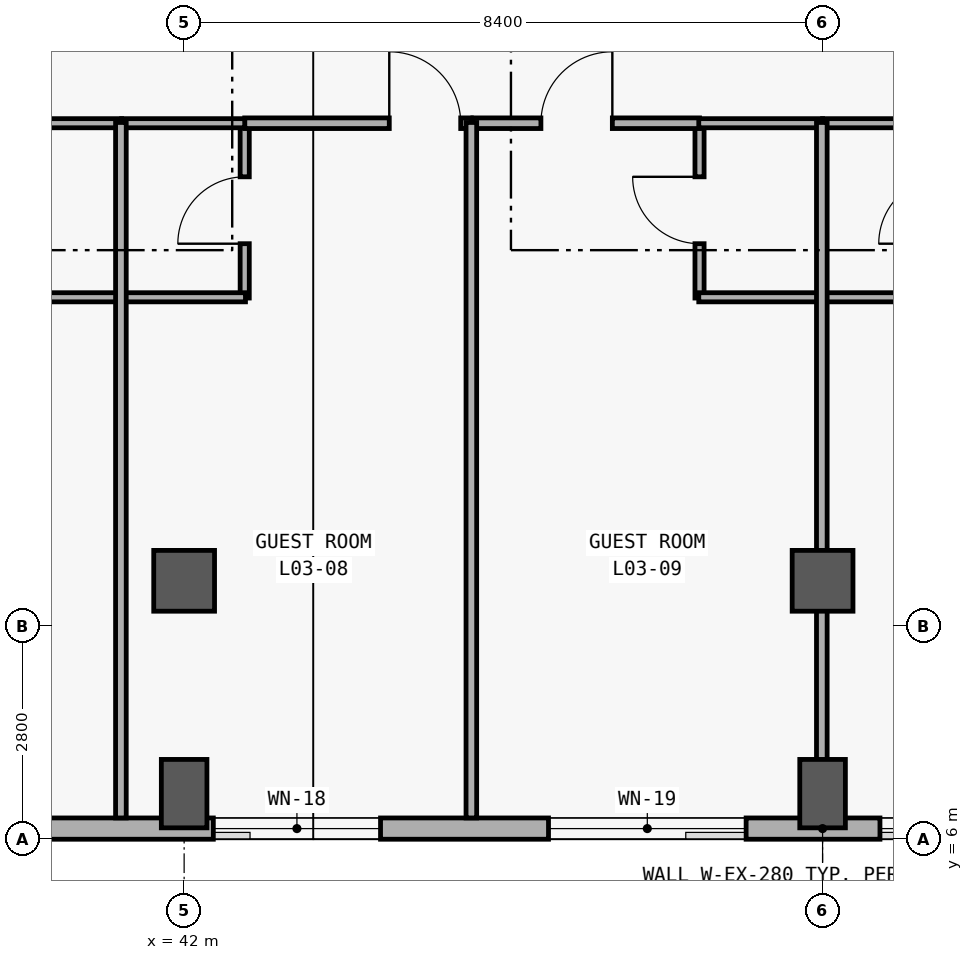
"""IFC4 building model, lengths in metres.
Left out: names, types, materials, properties, quantities, classifications, styles, units other than length and angle.
Written with IfcOpenShell. Run it as: python <this file> out.ifc"""

import sys

from ifc_helpers import new_model, si_unit, direction, frame, frame_2d, origin, origin_2d, place, context, subcontext, project, spatial, rectangle, extrude, element, fill, save


model = new_model("IFC4")
c1 = context("Model", 3, precision=1e-05, world=origin(), true_north=direction((0.0, 1.0)))
c2 = subcontext(c1, "Body", "Model", "MODEL_VIEW")
j1 = project(units=[si_unit("LENGTHUNIT", "METRE"), si_unit("PLANEANGLEUNIT", "RADIAN")], contexts=[c1])
p1 = place(None, origin())
s1 = spatial("IfcSite", under=j1, at=p1, CompositionType="ELEMENT")
p2 = place(p1, origin())
s2 = spatial("IfcBuilding", under=s1, at=p2, CompositionType="ELEMENT")
p3 = place(p2, frame((0.0, 0.0, 15.0)))
s3 = spatial("IfcBuildingStorey", under=s2, at=p3, CompositionType="ELEMENT", Elevation=15.0)
p4 = place(p3, frame((42.0, 6.6, 0.0), z_axis=(0.0, 0.0, 1.0), x_axis=(0.0, 1.0, 0.0)))
e1 = element("IfcColumn", 1, at=p4, inside=s3, PredefinedType="COLUMN", context=c2, shape_type="SweptSolid", body=[
    extrude(rectangle(XDim=0.6, YDim=0.9, at=origin_2d()), origin(), (0.0, 0.0, 1.0), 4.2),
])
p5 = place(p3, frame((42.0, 9.4, 0.0), z_axis=(0.0, 0.0, 1.0), x_axis=(1.0, 0.0, 0.0)))
e2 = element("IfcColumn", 2, at=p5, inside=s3, PredefinedType="COLUMN", context=c2, shape_type="SweptSolid", body=[
    extrude(rectangle(XDim=0.8, YDim=0.8, at=origin_2d()), origin(), (0.0, 0.0, 1.0), 4.2),
])
p6 = place(p3, frame((50.4, 6.6, 0.0), z_axis=(0.0, 0.0, 1.0), x_axis=(0.0, 1.0, 0.0)))
e3 = element("IfcColumn", 3, at=p6, inside=s3, PredefinedType="COLUMN", context=c2, shape_type="SweptSolid", body=[
    extrude(rectangle(XDim=0.6, YDim=0.9, at=origin_2d()), origin(), (0.0, 0.0, 1.0), 4.2),
])
p7 = place(p3, frame((50.4, 9.4, 0.0), z_axis=(0.0, 0.0, 1.0), x_axis=(1.0, 0.0, 0.0)))
e4 = element("IfcColumn", 4, at=p7, inside=s3, PredefinedType="COLUMN", context=c2, shape_type="SweptSolid", body=[
    extrude(rectangle(XDim=0.8, YDim=0.8, at=origin_2d()), origin(), (0.0, 0.0, 1.0), 4.2),
])
p8 = place(p3, frame((92.12, 6.14, 0.0), z_axis=(0.0, 0.0, 1.0), x_axis=(-1.0, 0.0, 0.0)))
e5 = element("IfcWall", 5, at=p8, inside=s3, PredefinedType="SOLIDWALL", context=c2, shape_type="SweptSolid", body=[
    extrude(rectangle(XDim=83.44, YDim=0.28, at=frame_2d((41.72, 0.0))), origin(), (0.0, 0.0, 1.0), 3.92),
])
p9 = place(p8, frame((79.49, 0.0, 0.85)))
e6 = element("IfcOpeningElement", 6, at=p9, cuts=e5, PredefinedType="OPENING", context=c2, shape_type="SweptSolid", body=[
    extrude(rectangle(XDim=2.85, YDim=1.85, at=frame_2d((1.425, 0.925))), frame((0.0, 0.15, 0.0), z_axis=(0.0, -1.0, 0.0), x_axis=(1.0, 0.0, 0.0)), (0.0, 0.0, 1.0), 0.3),
])
p10 = place(p8, frame((74.704, 0.0, 0.85)))
e7 = element("IfcOpeningElement", 7, at=p10, cuts=e5, PredefinedType="OPENING", context=c2, shape_type="SweptSolid", body=[
    extrude(rectangle(XDim=3.2, YDim=1.95, at=frame_2d((1.6, 0.975))), frame((0.0, 0.15, 0.0), z_axis=(0.0, -1.0, 0.0), x_axis=(1.0, 0.0, 0.0)), (0.0, 0.0, 1.0), 0.3),
])
p11 = place(p8, frame((69.942, 0.0, 0.85)))
e8 = element("IfcOpeningElement", 8, at=p11, cuts=e5, PredefinedType="OPENING", context=c2, shape_type="SweptSolid", body=[
    extrude(rectangle(XDim=3.5, YDim=2.0, at=frame_2d((1.75, 1.0))), frame((0.0, 0.15, 0.0), z_axis=(0.0, -1.0, 0.0), x_axis=(1.0, 0.0, 0.0)), (0.0, 0.0, 1.0), 0.3),
])
p12 = place(p8, frame((66.382, 0.0, 0.85)))
e9 = element("IfcOpeningElement", 9, at=p12, cuts=e5, PredefinedType="OPENING", context=c2, shape_type="SweptSolid", body=[
    extrude(rectangle(XDim=1.4, YDim=1.6, at=frame_2d((0.7, 0.8))), frame((0.0, 0.15, 0.0), z_axis=(0.0, -1.0, 0.0), x_axis=(1.0, 0.0, 0.0)), (0.0, 0.0, 1.0), 0.3),
])
p13 = place(p8, frame((61.67, 0.0, 0.85)))
e10 = element("IfcOpeningElement", 10, at=p13, cuts=e5, PredefinedType="OPENING", context=c2, shape_type="SweptSolid", body=[
    extrude(rectangle(XDim=1.6, YDim=1.6, at=frame_2d((0.8, 0.8))), frame((0.0, 0.15, 0.0), z_axis=(0.0, -1.0, 0.0), x_axis=(1.0, 0.0, 0.0)), (0.0, 0.0, 1.0), 0.3),
])
p14 = place(p8, frame((56.959, 0.0, 0.85)))
e11 = element("IfcOpeningElement", 11, at=p14, cuts=e5, PredefinedType="OPENING", context=c2, shape_type="SweptSolid", body=[
    extrude(rectangle(XDim=1.8, YDim=1.6, at=frame_2d((0.9, 0.8))), frame((0.0, 0.15, 0.0), z_axis=(0.0, -1.0, 0.0), x_axis=(1.0, 0.0, 0.0)), (0.0, 0.0, 1.0), 0.3),
])
p15 = place(p8, frame((52.248, 0.0, 0.85)))
e12 = element("IfcOpeningElement", 12, at=p15, cuts=e5, PredefinedType="OPENING", context=c2, shape_type="SweptSolid", body=[
    extrude(rectangle(XDim=2.0, YDim=1.65, at=frame_2d((1.0, 0.825))), frame((0.0, 0.15, 0.0), z_axis=(0.0, -1.0, 0.0), x_axis=(1.0, 0.0, 0.0)), (0.0, 0.0, 1.0), 0.3),
])
p16 = place(p8, frame((47.536, 0.0, 0.85)))
e13 = element("IfcOpeningElement", 13, at=p16, cuts=e5, PredefinedType="OPENING", context=c2, shape_type="SweptSolid", body=[
    extrude(rectangle(XDim=2.2, YDim=1.65, at=frame_2d((1.1, 0.825))), frame((0.0, 0.15, 0.0), z_axis=(0.0, -1.0, 0.0), x_axis=(1.0, 0.0, 0.0)), (0.0, 0.0, 1.0), 0.3),
])
p17 = place(p8, frame((42.726, 0.0, 0.85)))
e14 = element("IfcOpeningElement", 14, at=p17, cuts=e5, PredefinedType="OPENING", context=c2, shape_type="SweptSolid", body=[
    extrude(rectangle(XDim=2.6, YDim=2.2, at=frame_2d((1.3, 1.1))), frame((0.0, 0.15, 0.0), z_axis=(0.0, -1.0, 0.0), x_axis=(1.0, 0.0, 0.0)), (0.0, 0.0, 1.0), 0.3),
])
p18 = place(p8, frame((37.865, 0.0, 0.85)))
e15 = element("IfcOpeningElement", 15, at=p18, cuts=e5, PredefinedType="OPENING", context=c2, shape_type="SweptSolid", body=[
    extrude(rectangle(XDim=3.1, YDim=2.2, at=frame_2d((1.55, 1.1))), frame((0.0, 0.15, 0.0), z_axis=(0.0, -1.0, 0.0), x_axis=(1.0, 0.0, 0.0)), (0.0, 0.0, 1.0), 0.3),
])
p19 = place(p8, frame((33.004, 0.0, 0.85)))
e16 = element("IfcOpeningElement", 16, at=p19, cuts=e5, PredefinedType="OPENING", context=c2, shape_type="SweptSolid", body=[
    extrude(rectangle(XDim=3.6, YDim=2.3, at=frame_2d((1.8, 1.15))), frame((0.0, 0.15, 0.0), z_axis=(0.0, -1.0, 0.0), x_axis=(1.0, 0.0, 0.0)), (0.0, 0.0, 1.0), 0.3),
])
p20 = place(p8, frame((29.568, 0.0, 0.85)))
e17 = element("IfcOpeningElement", 17, at=p20, cuts=e5, PredefinedType="OPENING", context=c2, shape_type="SweptSolid", body=[
    extrude(rectangle(XDim=1.25, YDim=1.45, at=frame_2d((0.625, 0.725))), frame((0.0, 0.15, 0.0), z_axis=(0.0, -1.0, 0.0), x_axis=(1.0, 0.0, 0.0)), (0.0, 0.0, 1.0), 0.3),
])
p21 = place(p8, frame((24.907, 0.0, 0.85)))
e18 = element("IfcOpeningElement", 18, at=p21, cuts=e5, PredefinedType="OPENING", context=c2, shape_type="SweptSolid", body=[
    extrude(rectangle(XDim=1.35, YDim=1.55, at=frame_2d((0.675, 0.775))), frame((0.0, 0.15, 0.0), z_axis=(0.0, -1.0, 0.0), x_axis=(1.0, 0.0, 0.0)), (0.0, 0.0, 1.0), 0.3),
])
p22 = place(p8, frame((20.245, 0.0, 0.85)))
e19 = element("IfcOpeningElement", 19, at=p22, cuts=e5, PredefinedType="OPENING", context=c2, shape_type="SweptSolid", body=[
    extrude(rectangle(XDim=1.45, YDim=1.65, at=frame_2d((0.725, 0.825))), frame((0.0, 0.15, 0.0), z_axis=(0.0, -1.0, 0.0), x_axis=(1.0, 0.0, 0.0)), (0.0, 0.0, 1.0), 0.3),
])
p23 = place(p8, frame((15.584, 0.0, 0.85)))
e20 = element("IfcOpeningElement", 20, at=p23, cuts=e5, PredefinedType="OPENING", context=c2, shape_type="SweptSolid", body=[
    extrude(rectangle(XDim=1.55, YDim=1.65, at=frame_2d((0.775, 0.825))), frame((0.0, 0.15, 0.0), z_axis=(0.0, -1.0, 0.0), x_axis=(1.0, 0.0, 0.0)), (0.0, 0.0, 1.0), 0.3),
])
p24 = place(p8, frame((10.898, 0.0, 0.85)))
e21 = element("IfcOpeningElement", 21, at=p24, cuts=e5, PredefinedType="OPENING", context=c2, shape_type="SweptSolid", body=[
    extrude(rectangle(XDim=1.7, YDim=2.0, at=frame_2d((0.85, 1.0))), frame((0.0, 0.15, 0.0), z_axis=(0.0, -1.0, 0.0), x_axis=(1.0, 0.0, 0.0)), (0.0, 0.0, 1.0), 0.3),
])
p25 = place(p8, frame((5.987, 0.0, 0.85)))
e22 = element("IfcOpeningElement", 22, at=p25, cuts=e5, PredefinedType="OPENING", context=c2, shape_type="SweptSolid", body=[
    extrude(rectangle(XDim=2.3, YDim=2.05, at=frame_2d((1.15, 1.025))), frame((0.0, 0.15, 0.0), z_axis=(0.0, -1.0, 0.0), x_axis=(1.0, 0.0, 0.0)), (0.0, 0.0, 1.0), 0.3),
])
p26 = place(p8, frame((1.151, 0.0, 0.85)))
e23 = element("IfcOpeningElement", 23, at=p26, cuts=e5, PredefinedType="OPENING", context=c2, shape_type="SweptSolid", body=[
    extrude(rectangle(XDim=2.75, YDim=2.1, at=frame_2d((1.375, 1.05))), frame((0.0, 0.15, 0.0), z_axis=(0.0, -1.0, 0.0), x_axis=(1.0, 0.0, 0.0)), (0.0, 0.0, 1.0), 0.3),
])
p27 = place(p3, frame((42.797, 13.12, 0.0), z_axis=(0.0, 0.0, 1.0), x_axis=(0.0, 1.0, 0.0)))
e24 = element("IfcWall", 24, at=p27, inside=s3, PredefinedType="PARTITIONING", context=c2, shape_type="SweptSolid", body=[
    extrude(rectangle(XDim=2.31, YDim=0.12, at=frame_2d((1.155, 0.0))), origin(), (0.0, 0.0, 1.0), 3.02),
])
p28 = place(p27, frame((0.715, 0.0, 0.0)))
e25 = element("IfcOpeningElement", 25, at=p28, cuts=e24, PredefinedType="OPENING", context=c2, shape_type="SweptSolid", body=[
    extrude(rectangle(XDim=0.88, YDim=2.15, at=frame_2d((0.44, 1.075))), frame((0.0, 0.07, 0.0), z_axis=(0.0, -1.0, 0.0), x_axis=(1.0, 0.0, 0.0)), (0.0, 0.0, 1.0), 0.14),
])
p29 = place(p3, frame((48.781, 13.12, 0.0), z_axis=(0.0, 0.0, 1.0), x_axis=(0.0, 1.0, 0.0)))
e26 = element("IfcWall", 26, at=p29, inside=s3, PredefinedType="PARTITIONING", context=c2, shape_type="SweptSolid", body=[
    extrude(rectangle(XDim=2.31, YDim=0.12, at=frame_2d((1.155, 0.0))), origin(), (0.0, 0.0, 1.0), 3.02),
])
p30 = place(p29, frame((0.715, 0.0, 0.0)))
e27 = element("IfcOpeningElement", 27, at=p30, cuts=e26, PredefinedType="OPENING", context=c2, shape_type="SweptSolid", body=[
    extrude(rectangle(XDim=0.88, YDim=2.15, at=frame_2d((0.44, 1.075))), frame((0.0, 0.07, 0.0), z_axis=(0.0, -1.0, 0.0), x_axis=(1.0, 0.0, 0.0)), (0.0, 0.0, 1.0), 0.14),
])
p31 = place(p3, frame((42.797, 15.42, 0.0), z_axis=(0.0, 0.0, 1.0), x_axis=(1.0, 0.0, 0.0)))
e28 = element("IfcWall", 28, at=p31, inside=s3, PredefinedType="PARTITIONING", context=c2, shape_type="SweptSolid", body=[
    extrude(rectangle(XDim=2.982, YDim=0.14, at=frame_2d((1.491, 0.0))), origin(), (0.0, 0.0, 1.0), 3.02),
])
p32 = place(p31, frame((1.902, 0.0, 0.0)))
e29 = element("IfcOpeningElement", 29, at=p32, cuts=e28, PredefinedType="OPENING", context=c2, shape_type="SweptSolid", body=[
    extrude(rectangle(XDim=0.94, YDim=2.2, at=frame_2d((0.47, 1.1))), frame((0.0, 0.08, 0.0), z_axis=(0.0, -1.0, 0.0), x_axis=(1.0, 0.0, 0.0)), (0.0, 0.0, 1.0), 0.16),
])
p33 = place(p3, frame((45.799, 15.42, 0.0), z_axis=(0.0, 0.0, 1.0), x_axis=(1.0, 0.0, 0.0)))
e30 = element("IfcWall", 30, at=p33, inside=s3, PredefinedType="PARTITIONING", context=c2, shape_type="SweptSolid", body=[
    extrude(rectangle(XDim=2.982, YDim=0.14, at=frame_2d((1.491, 0.0))), origin(), (0.0, 0.0, 1.0), 3.02),
])
p34 = place(p33, frame((0.895, 0.0, 0.0)))
e31 = element("IfcOpeningElement", 31, at=p34, cuts=e30, PredefinedType="OPENING", context=c2, shape_type="SweptSolid", body=[
    extrude(rectangle(XDim=0.94, YDim=2.2, at=frame_2d((0.47, 1.1))), frame((0.0, 0.08, 0.0), z_axis=(0.0, -1.0, 0.0), x_axis=(1.0, 0.0, 0.0)), (0.0, 0.0, 1.0), 0.16),
])
for number, where, z_axis, x_axis in (
    (32, (39.549, 13.13, 0.0), (0.0, 0.0, 1.0), (1.0, 0.0, 0.0)),
    (33, (39.549, 15.42, 0.0), (0.0, 0.0, 1.0), (1.0, 0.0, 0.0)),
    (34, (41.178, 13.13, 0.0), (0.0, 0.0, 1.0), (1.0, 0.0, 0.0)),
):
    element("IfcWall", number, at=place(p3, frame(where, z_axis=z_axis, x_axis=x_axis)), inside=s3, PredefinedType="PARTITIONING", context=c2, shape_type="SweptSolid", body=[
        extrude(rectangle(XDim=1.629, YDim=0.12, at=frame_2d((0.814, 0.0))), origin(), (0.0, 0.0, 1.0), 3.02),
    ])
p35 = place(p3, frame((41.178, 15.42, 0.0), z_axis=(0.0, 0.0, 1.0), x_axis=(1.0, 0.0, 0.0)))
e35 = element("IfcWall", 35, at=p35, inside=s3, PredefinedType="PARTITIONING", context=c2, shape_type="SweptSolid", body=[
    extrude(rectangle(XDim=1.619, YDim=0.12, at=frame_2d((0.81, 0.0))), origin(), (0.0, 0.0, 1.0), 3.02),
])
for number, where, z_axis, x_axis in (
    (36, (48.771, 13.13, 0.0), (0.0, 0.0, 1.0), (1.0, 0.0, 0.0)),
    (37, (48.771, 15.42, 0.0), (0.0, 0.0, 1.0), (1.0, 0.0, 0.0)),
):
    element("IfcWall", number, at=place(p3, frame(where, z_axis=z_axis, x_axis=x_axis)), inside=s3, PredefinedType="PARTITIONING", context=c2, shape_type="SweptSolid", body=[
        extrude(rectangle(XDim=1.629, YDim=0.12, at=frame_2d((0.814, 0.0))), origin(), (0.0, 0.0, 1.0), 3.02),
    ])
p36 = place(p3, frame((50.4, 13.13, 0.0), z_axis=(0.0, 0.0, 1.0), x_axis=(1.0, 0.0, 0.0)))
e38 = element("IfcWall", 38, at=p36, inside=s3, PredefinedType="PARTITIONING", context=c2, shape_type="SweptSolid", body=[
    extrude(rectangle(XDim=1.629, YDim=0.12, at=frame_2d((0.814, 0.0))), origin(), (0.0, 0.0, 1.0), 3.02),
])
p37 = place(p3, frame((50.4, 15.42, 0.0), z_axis=(0.0, 0.0, 1.0), x_axis=(1.0, 0.0, 0.0)))
e39 = element("IfcWall", 39, at=p37, inside=s3, PredefinedType="PARTITIONING", context=c2, shape_type="SweptSolid", body=[
    extrude(rectangle(XDim=1.619, YDim=0.12, at=frame_2d((0.81, 0.0))), origin(), (0.0, 0.0, 1.0), 3.02),
])
for number, where, z_axis, x_axis in (
    (40, (41.168, 6.28, 0.0), (0.0, 0.0, 1.0), (0.0, 1.0, 0.0)),
    (41, (45.779, 6.28, 0.0), (0.0, 0.0, 1.0), (0.0, 1.0, 0.0)),
    (42, (50.39, 6.28, 0.0), (0.0, 0.0, 1.0), (0.0, 1.0, 0.0)),
):
    element("IfcWall", number, at=place(p3, frame(where, z_axis=z_axis, x_axis=x_axis)), inside=s3, PredefinedType="PARTITIONING", context=c2, shape_type="SweptSolid", body=[
        extrude(rectangle(XDim=9.15, YDim=0.14, at=frame_2d((4.575, 0.0))), origin(), (0.0, 0.0, 1.0), 3.02),
    ])
p38 = place(p16, origin())
e43 = element("IfcWindow", 43, at=p38, inside=s3, PartitioningType="SINGLE_PANEL", PredefinedType="WINDOW", context=c2, shape_type="SweptSolid", body=[
    extrude(rectangle(XDim=2.2, YDim=1.65, at=frame_2d((1.1, 0.825))), frame((0.0, 0.03, 0.0), z_axis=(0.0, -1.0, 0.0), x_axis=(1.0, 0.0, 0.0)), (0.0, 0.0, 1.0), 0.06),
])
fill(e13, e43)
p39 = place(p17, origin())
e44 = element("IfcWindow", 44, at=p39, inside=s3, PartitioningType="SINGLE_PANEL", PredefinedType="WINDOW", context=c2, shape_type="SweptSolid", body=[
    extrude(rectangle(XDim=2.6, YDim=2.2, at=frame_2d((1.3, 1.1))), frame((0.0, 0.03, 0.0), z_axis=(0.0, -1.0, 0.0), x_axis=(1.0, 0.0, 0.0)), (0.0, 0.0, 1.0), 0.06),
])
fill(e14, e44)
p40 = place(p18, origin())
e45 = element("IfcWindow", 45, at=p40, inside=s3, PartitioningType="SINGLE_PANEL", PredefinedType="WINDOW", context=c2, shape_type="SweptSolid", body=[
    extrude(rectangle(XDim=3.1, YDim=2.2, at=frame_2d((1.55, 1.1))), frame((0.0, 0.03, 0.0), z_axis=(0.0, -1.0, 0.0), x_axis=(1.0, 0.0, 0.0)), (0.0, 0.0, 1.0), 0.06),
])
fill(e15, e45)
p41 = place(p28, origin())
e46 = element("IfcDoor", 46, at=p41, inside=s3, OperationType="SINGLE_SWING_LEFT", PredefinedType="DOOR", context=c2, shape_type="SweptSolid", body=[
    extrude(rectangle(XDim=0.88, YDim=2.15, at=frame_2d((0.44, 1.075))), frame((0.0, 0.025, 0.0), z_axis=(0.0, -1.0, 0.0), x_axis=(1.0, 0.0, 0.0)), (0.0, 0.0, 1.0), 0.05),
])
fill(e25, e46)
p42 = place(p30, origin())
e47 = element("IfcDoor", 47, at=p42, inside=s3, OperationType="SINGLE_SWING_RIGHT", PredefinedType="DOOR", context=c2, shape_type="SweptSolid", body=[
    extrude(rectangle(XDim=0.88, YDim=2.15, at=frame_2d((0.44, 1.075))), frame((0.0, 0.025, 0.0), z_axis=(0.0, -1.0, 0.0), x_axis=(1.0, 0.0, 0.0)), (0.0, 0.0, 1.0), 0.05),
])
fill(e27, e47)
p43 = place(p32, origin())
e48 = element("IfcDoor", 48, at=p43, inside=s3, OperationType="SINGLE_SWING_LEFT", PredefinedType="DOOR", context=c2, shape_type="SweptSolid", body=[
    extrude(rectangle(XDim=0.94, YDim=2.2, at=frame_2d((0.47, 1.1))), frame((0.0, 0.025, 0.0), z_axis=(0.0, -1.0, 0.0), x_axis=(1.0, 0.0, 0.0)), (0.0, 0.0, 1.0), 0.05),
])
fill(e29, e48)
p44 = place(p34, origin())
e49 = element("IfcDoor", 49, at=p44, inside=s3, OperationType="SINGLE_SWING_RIGHT", PredefinedType="DOOR", context=c2, shape_type="SweptSolid", body=[
    extrude(rectangle(XDim=0.94, YDim=2.2, at=frame_2d((0.47, 1.1))), frame((0.0, 0.025, 0.0), z_axis=(0.0, -1.0, 0.0), x_axis=(1.0, 0.0, 0.0)), (0.0, 0.0, 1.0), 0.05),
])
fill(e31, e49)
save(model, sys.argv[1])
